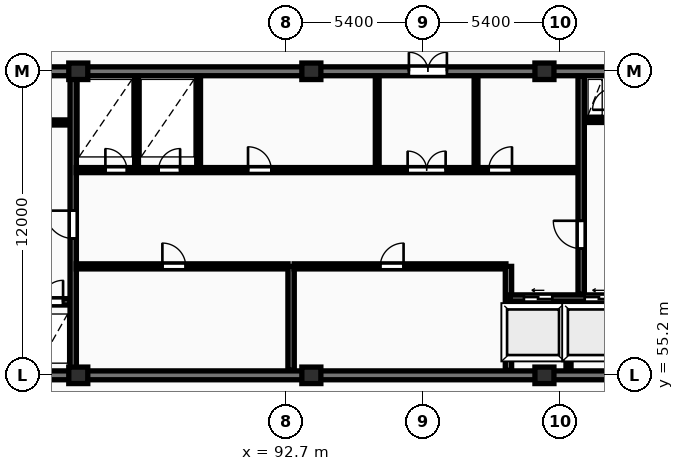
"""IFC4 building model, lengths in metres.
Left out: names, types, materials, properties, quantities, classifications, styles, units other than length and angle.
Written with IfcOpenShell. Run it as: python <this file> out.ifc"""

import sys

from ifc_helpers import new_model, si_unit, direction, frame, frame_2d, origin, origin_2d, place, context, subcontext, project, spatial, rectangle, extrude, element, fill, save


model = new_model("IFC4")
c1 = context("Model", 3, precision=1e-05, world=origin(), true_north=direction((0.0, 1.0)))
c2 = subcontext(c1, "Body", "Model", "MODEL_VIEW")
j1 = project(units=[si_unit("LENGTHUNIT", "METRE"), si_unit("PLANEANGLEUNIT", "RADIAN")], contexts=[c1])
p1 = place(None, origin())
s1 = spatial("IfcSite", under=j1, at=p1, CompositionType="ELEMENT")
p2 = place(p1, origin())
s2 = spatial("IfcBuilding", under=s1, at=p2, CompositionType="ELEMENT")
p3 = place(p2, frame((0.0, 0.0, 228.65)))
s3 = spatial("IfcBuildingStorey", under=s2, at=p3, CompositionType="ELEMENT", Elevation=228.65)
for number, where, z_axis, x_axis in (
    (1, (84.5, 55.2, 0.0), (0.0, 0.0, 1.0), (1.0, 0.0, 0.0)),
    (2, (84.5, 67.2, 0.0), (0.0, 0.0, 1.0), (1.0, 0.0, 0.0)),
    (3, (93.7, 55.2, 0.0), (0.0, 0.0, 1.0), (1.0, 0.0, 0.0)),
    (4, (93.7, 67.2, 0.0), (0.0, 0.0, 1.0), (1.0, 0.0, 0.0)),
    (5, (102.9, 55.2, 0.0), (0.0, 0.0, 1.0), (1.0, 0.0, 0.0)),
    (6, (102.9, 67.2, 0.0), (0.0, 0.0, 1.0), (1.0, 0.0, 0.0)),
):
    element("IfcColumn", number, at=place(p3, frame(where, z_axis=z_axis, x_axis=x_axis)), inside=s3, PredefinedType="COLUMN", context=c2, shape_type="SweptSolid", body=[
        extrude(rectangle(XDim=0.75, YDim=0.65, at=origin_2d()), origin(), (0.0, 0.0, 1.0), 3.45),
    ])
p4 = place(p3, frame((75.95, 55.2, 0.0), z_axis=(0.0, 0.0, 1.0), x_axis=(1.0, 0.0, 0.0)))
e7 = element("IfcWall", 7, at=p4, inside=s3, PredefinedType="SHEAR", context=c2, shape_type="SweptSolid", body=[
    extrude(rectangle(XDim=36.3, YDim=0.35, at=frame_2d((18.15, 0.0))), origin(), (0.0, 0.0, 1.0), 3.45),
])
p5 = place(p3, frame((75.95, 67.2, 0.0), z_axis=(0.0, 0.0, 1.0), x_axis=(1.0, 0.0, 0.0)))
e8 = element("IfcWall", 8, at=p5, inside=s3, PredefinedType="SHEAR", context=c2, shape_type="SweptSolid", body=[
    extrude(rectangle(XDim=36.3, YDim=0.35, at=frame_2d((18.15, 0.0))), origin(), (0.0, 0.0, 1.0), 3.45),
])
p6 = place(p5, frame((5.25, 0.0, 0.0)))
e9 = element("IfcOpeningElement", 9, at=p6, cuts=e8, PredefinedType="OPENING", context=c2, shape_type="SweptSolid", body=[
    extrude(rectangle(XDim=1.0, YDim=2.15, at=frame_2d((0.5, 1.075))), frame((0.0, 0.185, 0.0), z_axis=(0.0, -1.0, 0.0), x_axis=(1.0, 0.0, 0.0)), (0.0, 0.0, 1.0), 0.37),
])
p7 = place(p5, frame((21.6, 0.0, 0.0)))
e10 = element("IfcOpeningElement", 10, at=p7, cuts=e8, PredefinedType="OPENING", context=c2, shape_type="SweptSolid", body=[
    extrude(rectangle(XDim=1.5, YDim=2.2, at=frame_2d((0.75, 1.1))), frame((0.0, 0.185, 0.0), z_axis=(0.0, -1.0, 0.0), x_axis=(1.0, 0.0, 0.0)), (0.0, 0.0, 1.0), 0.37),
])
p8 = place(p5, frame((30.45, 0.0, 0.0)))
e11 = element("IfcOpeningElement", 11, at=p8, cuts=e8, PredefinedType="OPENING", context=c2, shape_type="SweptSolid", body=[
    extrude(rectangle(XDim=1.0, YDim=2.15, at=frame_2d((0.5, 1.075))), frame((0.0, 0.185, 0.0), z_axis=(0.0, -1.0, 0.0), x_axis=(1.0, 0.0, 0.0)), (0.0, 0.0, 1.0), 0.37),
])
p9 = place(p3, frame((79.79, 58.1, 0.0), z_axis=(0.0, 0.0, 1.0), x_axis=(1.0, 0.0, 0.0)))
e12 = element("IfcWall", 12, at=p9, inside=s3, PredefinedType="SHEAR", context=c2, shape_type="SweptSolid", body=[
    extrude(rectangle(XDim=4.39, YDim=0.25, at=frame_2d((2.195, 0.0))), origin(), (0.0, 0.0, 1.0), 3.45),
])
p10 = place(p9, frame((1.05, 0.0, 0.0)))
e13 = element("IfcOpeningElement", 13, at=p10, cuts=e12, PredefinedType="OPENING", context=c2, shape_type="SweptSolid", body=[
    extrude(rectangle(XDim=1.12, YDim=2.12, at=frame_2d((0.56, 1.06))), frame((0.0, 0.135, 0.0), z_axis=(0.0, -1.0, 0.0), x_axis=(1.0, 0.0, 0.0)), (0.0, 0.0, 1.0), 0.27),
])
p11 = place(p9, frame((3.26, 0.0, 0.0)))
e14 = element("IfcOpeningElement", 14, at=p11, cuts=e12, PredefinedType="OPENING", context=c2, shape_type="SweptSolid", body=[
    extrude(rectangle(XDim=0.85, YDim=2.05, at=frame_2d((0.425, 1.025))), frame((0.0, 0.135, 0.0), z_axis=(0.0, -1.0, 0.0), x_axis=(1.0, 0.0, 0.0)), (0.0, 0.0, 1.0), 0.27),
])
p12 = place(p3, frame((79.79, 65.18, 0.0), z_axis=(0.0, 0.0, 1.0), x_axis=(1.0, 0.0, 0.0)))
e15 = element("IfcWall", 15, at=p12, inside=s3, PredefinedType="PARTITIONING", context=c2, shape_type="SweptSolid", body=[
    extrude(rectangle(XDim=4.39, YDim=0.2, at=frame_2d((2.195, 0.0))), origin(), (0.0, 0.0, 1.0), 3.17),
])
p13 = place(p12, frame((1.5, 0.0, 0.0)))
e16 = element("IfcOpeningElement", 16, at=p13, cuts=e15, PredefinedType="OPENING", context=c2, shape_type="SweptSolid", body=[
    extrude(rectangle(XDim=1.1, YDim=2.1, at=frame_2d((0.55, 1.05))), frame((0.0, 0.11, 0.0), z_axis=(0.0, -1.0, 0.0), x_axis=(1.0, 0.0, 0.0)), (0.0, 0.0, 1.0), 0.22),
])
p14 = place(p3, frame((84.3, 55.4, 0.0), z_axis=(0.0, 0.0, 1.0), x_axis=(0.0, 1.0, 0.0)))
e17 = element("IfcWall", 17, at=p14, inside=s3, PredefinedType="SHEAR", context=c2, shape_type="SweptSolid", body=[
    extrude(rectangle(XDim=11.6, YDim=0.25, at=frame_2d((5.8, 0.0))), origin(), (0.0, 0.0, 1.0), 3.45),
])
p15 = place(p14, frame((5.2, 0.0, 0.0)))
e18 = element("IfcOpeningElement", 18, at=p15, cuts=e17, PredefinedType="OPENING", context=c2, shape_type="SweptSolid", body=[
    extrude(rectangle(XDim=1.1, YDim=2.1, at=frame_2d((0.55, 1.05))), frame((0.0, 0.135, 0.0), z_axis=(0.0, -1.0, 0.0), x_axis=(1.0, 0.0, 0.0)), (0.0, 0.0, 1.0), 0.27),
])
p16 = place(p3, frame((84.42, 59.5, 0.0), z_axis=(0.0, 0.0, 1.0), x_axis=(1.0, 0.0, 0.0)))
e19 = element("IfcWall", 19, at=p16, inside=s3, PredefinedType="PARTITIONING", context=c2, shape_type="SweptSolid", body=[
    extrude(rectangle(XDim=8.36, YDim=0.2, at=frame_2d((4.18, 0.0))), origin(), (0.0, 0.0, 1.0), 3.17),
])
p17 = place(p16, frame((3.4, 0.0, 0.0)))
e20 = element("IfcOpeningElement", 20, at=p17, cuts=e19, PredefinedType="OPENING", context=c2, shape_type="SweptSolid", body=[
    extrude(rectangle(XDim=0.92, YDim=2.08, at=frame_2d((0.46, 1.04))), frame((0.0, 0.11, 0.0), z_axis=(0.0, -1.0, 0.0), x_axis=(1.0, 0.0, 0.0)), (0.0, 0.0, 1.0), 0.22),
])
p18 = place(p3, frame((92.9, 55.4, 0.0), z_axis=(0.0, 0.0, 1.0), x_axis=(0.0, 1.0, 0.0)))
e21 = element("IfcWall", 21, at=p18, inside=s3, PredefinedType="SHEAR", context=c2, shape_type="SweptSolid", body=[
    extrude(rectangle(XDim=4.1, YDim=0.25, at=frame_2d((2.05, 0.0))), origin(), (0.0, 0.0, 1.0), 3.45),
])
p19 = place(p3, frame((93.02, 59.5, 0.0), z_axis=(0.0, 0.0, 1.0), x_axis=(1.0, 0.0, 0.0)))
e22 = element("IfcWall", 22, at=p19, inside=s3, PredefinedType="PARTITIONING", context=c2, shape_type="SweptSolid", body=[
    extrude(rectangle(XDim=8.36, YDim=0.2, at=frame_2d((4.18, 0.0))), origin(), (0.0, 0.0, 1.0), 3.17),
])
p20 = place(p19, frame((3.4, 0.0, 0.0)))
e23 = element("IfcOpeningElement", 23, at=p20, cuts=e22, PredefinedType="OPENING", context=c2, shape_type="SweptSolid", body=[
    extrude(rectangle(XDim=0.92, YDim=2.08, at=frame_2d((0.46, 1.04))), frame((0.0, 0.11, 0.0), z_axis=(0.0, -1.0, 0.0), x_axis=(1.0, 0.0, 0.0)), (0.0, 0.0, 1.0), 0.22),
])
p21 = place(p3, frame((101.48, 55.4, 0.0), z_axis=(0.0, 0.0, 1.0), x_axis=(0.0, 1.0, 0.0)))
e24 = element("IfcWall", 24, at=p21, inside=s3, PredefinedType="SHEAR", context=c2, shape_type="SweptSolid", body=[
    extrude(rectangle(XDim=4.1, YDim=0.25, at=frame_2d((2.05, 0.0))), origin(), (0.0, 0.0, 1.0), 3.45),
])
p22 = place(p3, frame((103.85, 55.4, 0.0), z_axis=(0.0, 0.0, 1.0), x_axis=(0.0, 1.0, 0.0)))
e25 = element("IfcWall", 25, at=p22, inside=s3, PredefinedType="PARTITIONING", context=c2, shape_type="SweptSolid", body=[
    extrude(rectangle(XDim=2.72, YDim=0.2, at=frame_2d((1.36, 0.0))), origin(), (0.0, 0.0, 1.0), 3.17),
])
p23 = place(p3, frame((101.55, 58.25, 0.0), z_axis=(0.0, 0.0, 1.0), x_axis=(1.0, 0.0, 0.0)))
e26 = element("IfcWall", 26, at=p23, inside=s3, PredefinedType="SHEAR", context=c2, shape_type="SweptSolid", body=[
    extrude(rectangle(XDim=4.6, YDim=0.25, at=frame_2d((2.3, 0.0))), origin(), (0.0, 0.0, 1.0), 3.45),
])
p24 = place(p23, frame((0.54, 0.0, 0.0)))
e27 = element("IfcOpeningElement", 27, at=p24, cuts=e26, PredefinedType="OPENING", context=c2, shape_type="SweptSolid", body=[
    extrude(rectangle(XDim=1.12, YDim=2.12, at=frame_2d((0.56, 1.06))), frame((0.0, 0.135, 0.0), z_axis=(0.0, -1.0, 0.0), x_axis=(1.0, 0.0, 0.0)), (0.0, 0.0, 1.0), 0.27),
])
p25 = place(p23, frame((2.94, 0.0, 0.0)))
e28 = element("IfcOpeningElement", 28, at=p25, cuts=e26, PredefinedType="OPENING", context=c2, shape_type="SweptSolid", body=[
    extrude(rectangle(XDim=1.12, YDim=2.12, at=frame_2d((0.56, 1.06))), frame((0.0, 0.135, 0.0), z_axis=(0.0, -1.0, 0.0), x_axis=(1.0, 0.0, 0.0)), (0.0, 0.0, 1.0), 0.27),
])
for number, where, z_axis, x_axis in (
    (29, (86.8, 63.4, 0.0), (0.0, 0.0, 1.0), (0.0, 1.0, 0.0)),
    (30, (89.25, 63.4, 0.0), (0.0, 0.0, 1.0), (0.0, 1.0, 0.0)),
    (31, (96.3, 63.4, 0.0), (0.0, 0.0, 1.0), (0.0, 1.0, 0.0)),
    (32, (100.2, 63.4, 0.0), (0.0, 0.0, 1.0), (0.0, 1.0, 0.0)),
):
    element("IfcWall", number, at=place(p3, frame(where, z_axis=z_axis, x_axis=x_axis)), inside=s3, PredefinedType="PARTITIONING", context=c2, shape_type="SweptSolid", body=[
        extrude(rectangle(XDim=3.6, YDim=0.15, at=frame_2d((1.8, 0.0))), origin(), (0.0, 0.0, 1.0), 3.17),
    ])
p26 = place(p3, frame((84.42, 63.3, 0.0), z_axis=(0.0, 0.0, 1.0), x_axis=(1.0, 0.0, 0.0)))
e33 = element("IfcWall", 33, at=p26, inside=s3, PredefinedType="PARTITIONING", context=c2, shape_type="SweptSolid", body=[
    extrude(rectangle(XDim=19.83, YDim=0.2, at=frame_2d((9.915, 0.0))), origin(), (0.0, 0.0, 1.0), 3.17),
])
p27 = place(p26, frame((1.15, 0.0, 0.0)))
e34 = element("IfcOpeningElement", 34, at=p27, cuts=e33, PredefinedType="OPENING", context=c2, shape_type="SweptSolid", body=[
    extrude(rectangle(XDim=0.85, YDim=2.05, at=frame_2d((0.425, 1.025))), frame((0.0, 0.11, 0.0), z_axis=(0.0, -1.0, 0.0), x_axis=(1.0, 0.0, 0.0)), (0.0, 0.0, 1.0), 0.22),
])
p28 = place(p26, frame((3.25, 0.0, 0.0)))
e35 = element("IfcOpeningElement", 35, at=p28, cuts=e33, PredefinedType="OPENING", context=c2, shape_type="SweptSolid", body=[
    extrude(rectangle(XDim=0.85, YDim=2.05, at=frame_2d((0.425, 1.025))), frame((0.0, 0.11, 0.0), z_axis=(0.0, -1.0, 0.0), x_axis=(1.0, 0.0, 0.0)), (0.0, 0.0, 1.0), 0.22),
])
p29 = place(p26, frame((13.08, 0.0, 0.0)))
e36 = element("IfcOpeningElement", 36, at=p29, cuts=e33, PredefinedType="OPENING", context=c2, shape_type="SweptSolid", body=[
    extrude(rectangle(XDim=1.5, YDim=2.2, at=frame_2d((0.75, 1.1))), frame((0.0, 0.11, 0.0), z_axis=(0.0, -1.0, 0.0), x_axis=(1.0, 0.0, 0.0)), (0.0, 0.0, 1.0), 0.22),
])
p30 = place(p26, frame((6.78, 0.0, 0.0)))
e37 = element("IfcOpeningElement", 37, at=p30, cuts=e33, PredefinedType="OPENING", context=c2, shape_type="SweptSolid", body=[
    extrude(rectangle(XDim=0.92, YDim=2.08, at=frame_2d((0.46, 1.04))), frame((0.0, 0.11, 0.0), z_axis=(0.0, -1.0, 0.0), x_axis=(1.0, 0.0, 0.0)), (0.0, 0.0, 1.0), 0.22),
])
p31 = place(p26, frame((16.28, 0.0, 0.0)))
e38 = element("IfcOpeningElement", 38, at=p31, cuts=e33, PredefinedType="OPENING", context=c2, shape_type="SweptSolid", body=[
    extrude(rectangle(XDim=0.92, YDim=2.08, at=frame_2d((0.46, 1.04))), frame((0.0, 0.11, 0.0), z_axis=(0.0, -1.0, 0.0), x_axis=(1.0, 0.0, 0.0)), (0.0, 0.0, 1.0), 0.22),
])
p32 = place(p3, frame((104.45, 65.28, 0.0), z_axis=(0.0, 0.0, 1.0), x_axis=(1.0, 0.0, 0.0)))
e39 = element("IfcWall", 39, at=p32, inside=s3, PredefinedType="PARTITIONING", context=c2, shape_type="SweptSolid", body=[
    extrude(rectangle(XDim=1.2, YDim=0.2, at=frame_2d((0.6, 0.0))), origin(), (0.0, 0.0, 1.0), 3.17),
])
p33 = place(p3, frame((104.35, 58.4, 0.0), z_axis=(0.0, 0.0, 1.0), x_axis=(0.0, 1.0, 0.0)))
e40 = element("IfcWall", 40, at=p33, inside=s3, PredefinedType="SHEAR", context=c2, shape_type="SweptSolid", body=[
    extrude(rectangle(XDim=8.6, YDim=0.25, at=frame_2d((4.3, 0.0))), origin(), (0.0, 0.0, 1.0), 3.45),
])
p34 = place(p33, frame((1.8, 0.0, 0.0)))
e41 = element("IfcOpeningElement", 41, at=p34, cuts=e40, PredefinedType="OPENING", context=c2, shape_type="SweptSolid", body=[
    extrude(rectangle(XDim=1.1, YDim=2.1, at=frame_2d((0.55, 1.05))), frame((0.0, 0.135, 0.0), z_axis=(0.0, -1.0, 0.0), x_axis=(1.0, 0.0, 0.0)), (0.0, 0.0, 1.0), 0.27),
])
p35 = place(p7, origin())
e42 = element("IfcDoor", 42, at=p35, inside=s3, OperationType="DOUBLE_DOOR_SINGLE_SWING", PredefinedType="DOOR", context=c2, shape_type="SweptSolid", body=[
    extrude(rectangle(XDim=1.5, YDim=2.2, at=frame_2d((0.75, 1.1))), frame((0.0, 0.025, 0.0), z_axis=(0.0, -1.0, 0.0), x_axis=(1.0, 0.0, 0.0)), (0.0, 0.0, 1.0), 0.05),
])
fill(e10, e42)
p36 = place(p11, origin())
e43 = element("IfcDoor", 43, at=p36, inside=s3, OperationType="SINGLE_SWING_RIGHT", PredefinedType="DOOR", context=c2, shape_type="SweptSolid", body=[
    extrude(rectangle(XDim=0.85, YDim=2.05, at=frame_2d((0.425, 1.025))), frame((0.0, 0.025, 0.0), z_axis=(0.0, -1.0, 0.0), x_axis=(1.0, 0.0, 0.0)), (0.0, 0.0, 1.0), 0.05),
])
fill(e14, e43)
p37 = place(p15, origin())
e44 = element("IfcDoor", 44, at=p37, inside=s3, OperationType="SINGLE_SWING_RIGHT", PredefinedType="DOOR", context=c2, shape_type="SweptSolid", body=[
    extrude(rectangle(XDim=1.1, YDim=2.1, at=frame_2d((0.55, 1.05))), frame((0.0, 0.025, 0.0), z_axis=(0.0, -1.0, 0.0), x_axis=(1.0, 0.0, 0.0)), (0.0, 0.0, 1.0), 0.05),
])
fill(e18, e44)
p38 = place(p17, origin())
e45 = element("IfcDoor", 45, at=p38, inside=s3, OperationType="SINGLE_SWING_LEFT", PredefinedType="DOOR", context=c2, shape_type="SweptSolid", body=[
    extrude(rectangle(XDim=0.92, YDim=2.08, at=frame_2d((0.46, 1.04))), frame((0.0, 0.025, 0.0), z_axis=(0.0, -1.0, 0.0), x_axis=(1.0, 0.0, 0.0)), (0.0, 0.0, 1.0), 0.05),
])
fill(e20, e45)
p39 = place(p20, origin())
e46 = element("IfcDoor", 46, at=p39, inside=s3, OperationType="SINGLE_SWING_RIGHT", PredefinedType="DOOR", context=c2, shape_type="SweptSolid", body=[
    extrude(rectangle(XDim=0.92, YDim=2.08, at=frame_2d((0.46, 1.04))), frame((0.0, 0.025, 0.0), z_axis=(0.0, -1.0, 0.0), x_axis=(1.0, 0.0, 0.0)), (0.0, 0.0, 1.0), 0.05),
])
fill(e23, e46)
p40 = place(p24, origin())
e47 = element("IfcDoor", 47, at=p40, inside=s3, OperationType="SLIDING_TO_LEFT", PredefinedType="DOOR", context=c2, shape_type="SweptSolid", body=[
    extrude(rectangle(XDim=1.12, YDim=2.12, at=frame_2d((0.56, 1.06))), frame((0.0, 0.025, 0.0), z_axis=(0.0, -1.0, 0.0), x_axis=(1.0, 0.0, 0.0)), (0.0, 0.0, 1.0), 0.05),
])
fill(e27, e47)
p41 = place(p25, origin())
e48 = element("IfcDoor", 48, at=p41, inside=s3, OperationType="SLIDING_TO_LEFT", PredefinedType="DOOR", context=c2, shape_type="SweptSolid", body=[
    extrude(rectangle(XDim=1.12, YDim=2.12, at=frame_2d((0.56, 1.06))), frame((0.0, 0.025, 0.0), z_axis=(0.0, -1.0, 0.0), x_axis=(1.0, 0.0, 0.0)), (0.0, 0.0, 1.0), 0.05),
])
fill(e28, e48)
p42 = place(p27, origin())
e49 = element("IfcDoor", 49, at=p42, inside=s3, OperationType="SINGLE_SWING_LEFT", PredefinedType="DOOR", context=c2, shape_type="SweptSolid", body=[
    extrude(rectangle(XDim=0.85, YDim=2.05, at=frame_2d((0.425, 1.025))), frame((0.0, 0.025, 0.0), z_axis=(0.0, -1.0, 0.0), x_axis=(1.0, 0.0, 0.0)), (0.0, 0.0, 1.0), 0.05),
])
fill(e34, e49)
p43 = place(p28, origin())
e50 = element("IfcDoor", 50, at=p43, inside=s3, OperationType="SINGLE_SWING_RIGHT", PredefinedType="DOOR", context=c2, shape_type="SweptSolid", body=[
    extrude(rectangle(XDim=0.85, YDim=2.05, at=frame_2d((0.425, 1.025))), frame((0.0, 0.025, 0.0), z_axis=(0.0, -1.0, 0.0), x_axis=(1.0, 0.0, 0.0)), (0.0, 0.0, 1.0), 0.05),
])
fill(e35, e50)
p44 = place(p29, origin())
e51 = element("IfcDoor", 51, at=p44, inside=s3, OperationType="DOUBLE_DOOR_SINGLE_SWING", PredefinedType="DOOR", context=c2, shape_type="SweptSolid", body=[
    extrude(rectangle(XDim=1.5, YDim=2.2, at=frame_2d((0.75, 1.1))), frame((0.0, 0.025, 0.0), z_axis=(0.0, -1.0, 0.0), x_axis=(1.0, 0.0, 0.0)), (0.0, 0.0, 1.0), 0.05),
])
fill(e36, e51)
p45 = place(p30, origin())
e52 = element("IfcDoor", 52, at=p45, inside=s3, OperationType="SINGLE_SWING_LEFT", PredefinedType="DOOR", context=c2, shape_type="SweptSolid", body=[
    extrude(rectangle(XDim=0.92, YDim=2.08, at=frame_2d((0.46, 1.04))), frame((0.0, 0.025, 0.0), z_axis=(0.0, -1.0, 0.0), x_axis=(1.0, 0.0, 0.0)), (0.0, 0.0, 1.0), 0.05),
])
fill(e37, e52)
p46 = place(p31, origin())
e53 = element("IfcDoor", 53, at=p46, inside=s3, OperationType="SINGLE_SWING_RIGHT", PredefinedType="DOOR", context=c2, shape_type="SweptSolid", body=[
    extrude(rectangle(XDim=0.92, YDim=2.08, at=frame_2d((0.46, 1.04))), frame((0.0, 0.025, 0.0), z_axis=(0.0, -1.0, 0.0), x_axis=(1.0, 0.0, 0.0)), (0.0, 0.0, 1.0), 0.05),
])
fill(e38, e53)
p47 = place(p34, origin())
e54 = element("IfcDoor", 54, at=p47, inside=s3, OperationType="SINGLE_SWING_RIGHT", PredefinedType="DOOR", context=c2, shape_type="SweptSolid", body=[
    extrude(rectangle(XDim=1.1, YDim=2.1, at=frame_2d((0.55, 1.05))), frame((0.0, 0.025, 0.0), z_axis=(0.0, -1.0, 0.0), x_axis=(1.0, 0.0, 0.0)), (0.0, 0.0, 1.0), 0.05),
])
fill(e41, e54)
save(model, sys.argv[1])
